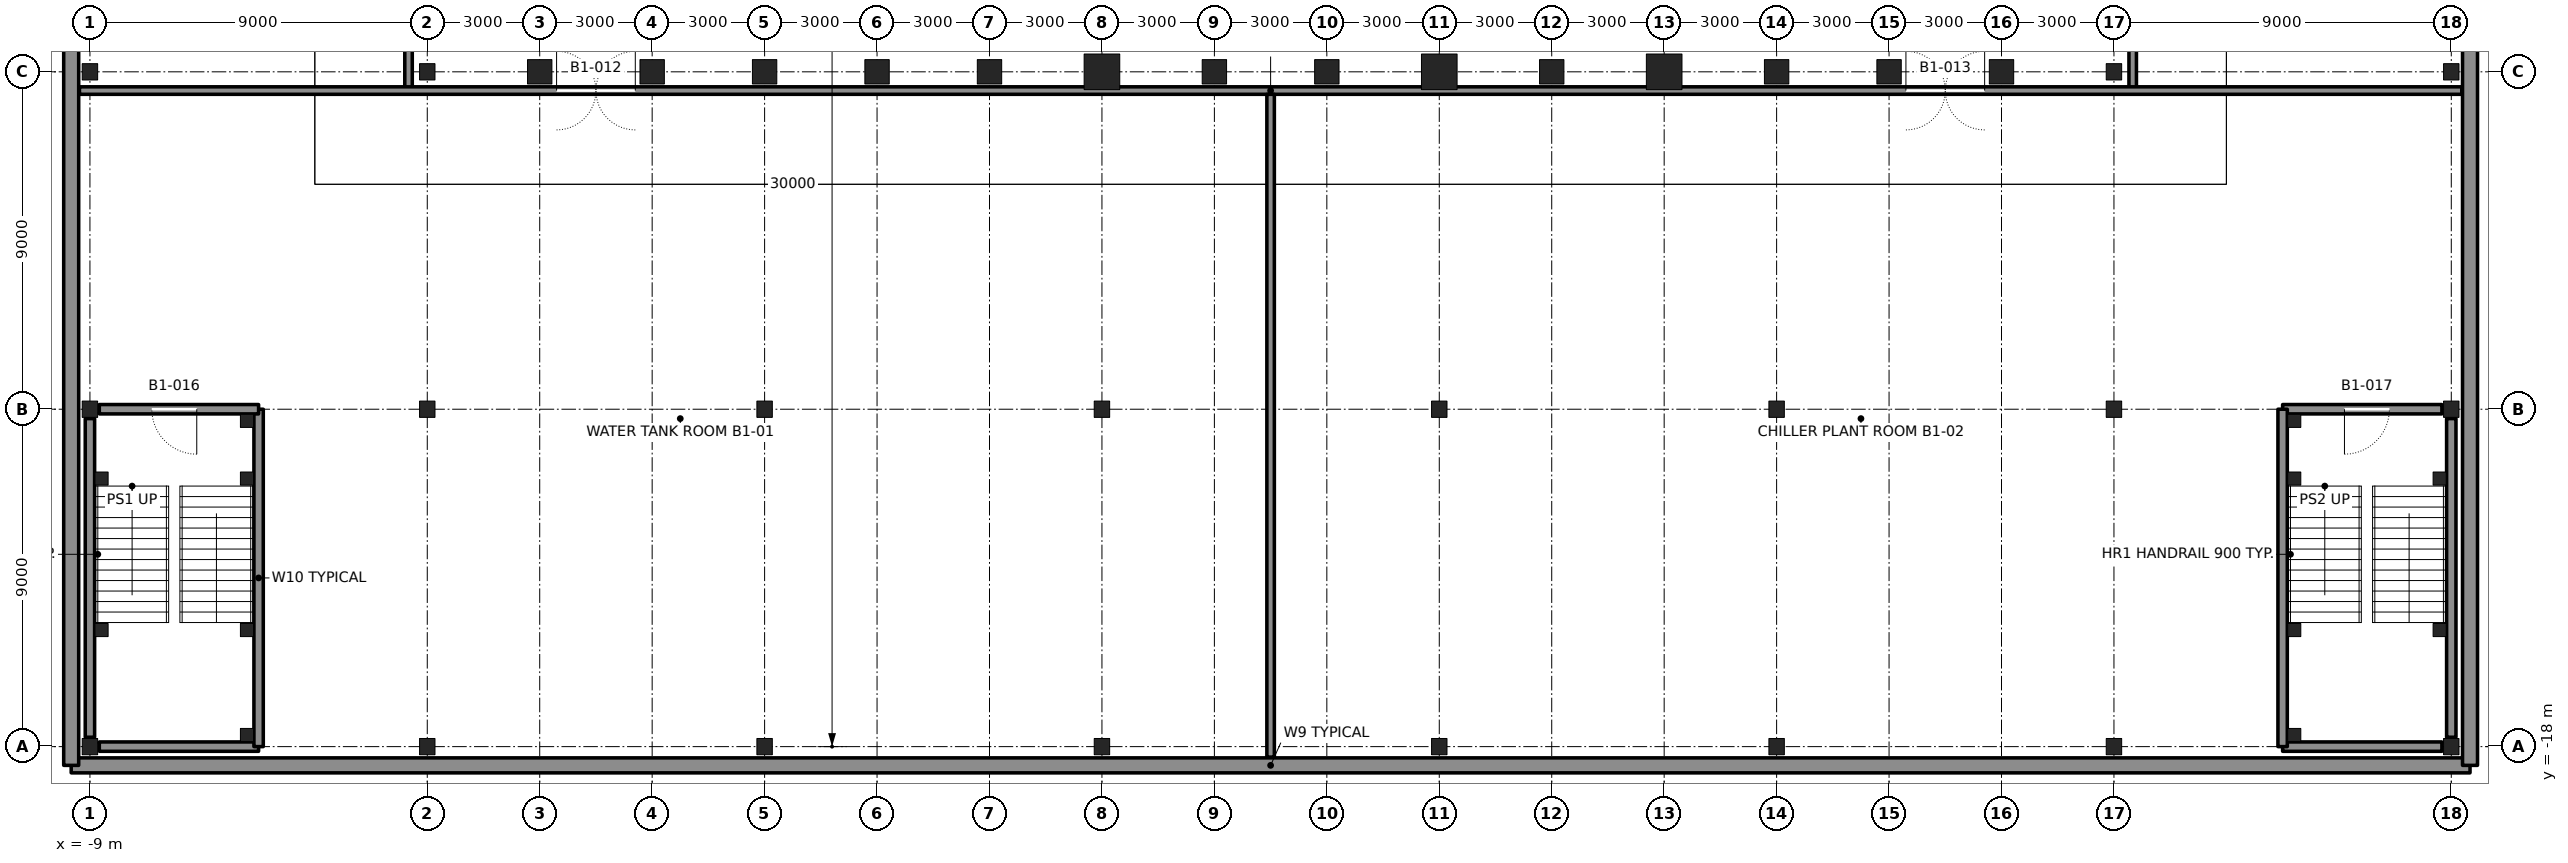
"""IFC4 building model, lengths in metres.
Left out: names, types, materials, properties, quantities, classifications, styles, units other than length and angle.
Written with IfcOpenShell. Run it as: python <this file> out.ifc"""

import sys

from ifc_helpers import new_model, si_unit, direction, frame, frame_2d, origin, origin_2d, place, context, subcontext, project, spatial, rectangle, hollow_rectangle, i_section, extrude, element, fill, save


model = new_model("IFC4")
c1 = context("Model", 3, precision=1e-05, world=origin(), true_north=direction((0.0, 1.0)))
c2 = subcontext(c1, "Body", "Model", "MODEL_VIEW")
j1 = project(units=[si_unit("LENGTHUNIT", "METRE"), si_unit("PLANEANGLEUNIT", "RADIAN")], contexts=[c1])
p1 = place(None, origin())
s1 = spatial("IfcSite", under=j1, at=p1, CompositionType="ELEMENT")
p2 = place(p1, origin())
s2 = spatial("IfcBuilding", under=s1, at=p2, CompositionType="ELEMENT")
p3 = place(p2, frame((0.0, 0.0, -5.0)))
s3 = spatial("IfcBuildingStorey", under=s2, at=p3, CompositionType="ELEMENT", Elevation=-5.0)
for number, where, z_axis, x_axis in (
    (1, (3.0, 0.0, -0.3), (0.0, 0.0, 1.0), (0.0, -1.0, 0.0)),
    (2, (6.0, 0.0, -0.3), (0.0, 0.0, 1.0), (0.0, -1.0, 0.0)),
    (3, (9.0, 0.0, -0.3), (0.0, 0.0, 1.0), (0.0, -1.0, 0.0)),
    (4, (12.0, 0.0, -0.3), (0.0, 0.0, 1.0), (0.0, -1.0, 0.0)),
    (5, (15.0, 0.0, -0.3), (0.0, 0.0, 1.0), (0.0, -1.0, 0.0)),
):
    element("IfcColumn", number, at=place(p3, frame(where, z_axis=z_axis, x_axis=x_axis)), inside=s3, PredefinedType="COLUMN", context=c2, shape_type="SweptSolid", body=[
        extrude(hollow_rectangle(XDim=0.65, YDim=0.65, WallThickness=0.065, at=origin_2d()), origin(), (0.0, 0.0, 1.0), 5.3),
    ])
p4 = place(p3, frame((18.0, 0.0, -0.3), z_axis=(0.0, 0.0, 1.0), x_axis=(0.0, -1.0, 0.0)))
e6 = element("IfcColumn", 6, at=p4, inside=s3, PredefinedType="COLUMN", context=c2, shape_type="SweptSolid", body=[
    extrude(hollow_rectangle(XDim=0.95, YDim=0.95, WallThickness=0.11, at=origin_2d()), origin(), (0.0, 0.0, 1.0), 5.3),
])
for number, where, z_axis, x_axis in (
    (7, (21.0, 0.0, -0.3), (0.0, 0.0, 1.0), (0.0, -1.0, 0.0)),
    (8, (24.0, 0.0, -0.3), (0.0, 0.0, 1.0), (0.0, -1.0, 0.0)),
):
    element("IfcColumn", number, at=place(p3, frame(where, z_axis=z_axis, x_axis=x_axis)), inside=s3, PredefinedType="COLUMN", context=c2, shape_type="SweptSolid", body=[
        extrude(hollow_rectangle(XDim=0.65, YDim=0.65, WallThickness=0.065, at=origin_2d()), origin(), (0.0, 0.0, 1.0), 5.3),
    ])
p5 = place(p3, frame((27.0, 0.0, -0.3), z_axis=(0.0, 0.0, 1.0), x_axis=(0.0, -1.0, 0.0)))
e9 = element("IfcColumn", 9, at=p5, inside=s3, PredefinedType="COLUMN", context=c2, shape_type="SweptSolid", body=[
    extrude(hollow_rectangle(XDim=0.95, YDim=0.95, WallThickness=0.11, at=origin_2d()), origin(), (0.0, 0.0, 1.0), 5.3),
])
p6 = place(p3, frame((30.0, 0.0, -0.3), z_axis=(0.0, 0.0, 1.0), x_axis=(0.0, -1.0, 0.0)))
e10 = element("IfcColumn", 10, at=p6, inside=s3, PredefinedType="COLUMN", context=c2, shape_type="SweptSolid", body=[
    extrude(hollow_rectangle(XDim=0.65, YDim=0.65, WallThickness=0.065, at=origin_2d()), origin(), (0.0, 0.0, 1.0), 5.3),
])
p7 = place(p3, frame((33.0, 0.0, -0.3), z_axis=(0.0, 0.0, 1.0), x_axis=(0.0, -1.0, 0.0)))
e11 = element("IfcColumn", 11, at=p7, inside=s3, PredefinedType="COLUMN", context=c2, shape_type="SweptSolid", body=[
    extrude(hollow_rectangle(XDim=0.95, YDim=0.95, WallThickness=0.11, at=origin_2d()), origin(), (0.0, 0.0, 1.0), 5.3),
])
for number, where, z_axis, x_axis in (
    (12, (36.0, 0.0, -0.3), (0.0, 0.0, 1.0), (0.0, -1.0, 0.0)),
    (13, (39.0, 0.0, -0.3), (0.0, 0.0, 1.0), (0.0, -1.0, 0.0)),
    (14, (42.0, 0.0, -0.3), (0.0, 0.0, 1.0), (0.0, -1.0, 0.0)),
):
    element("IfcColumn", number, at=place(p3, frame(where, z_axis=z_axis, x_axis=x_axis)), inside=s3, PredefinedType="COLUMN", context=c2, shape_type="SweptSolid", body=[
        extrude(hollow_rectangle(XDim=0.65, YDim=0.65, WallThickness=0.065, at=origin_2d()), origin(), (0.0, 0.0, 1.0), 5.3),
    ])
for number, where, z_axis, x_axis in (
    (15, (-9.0, -18.0, -0.3), (0.0, 0.0, 1.0), (1.0, 0.0, 0.0)),
    (16, (-9.0, -9.0, -0.3), (0.0, 0.0, 1.0), (1.0, 0.0, 0.0)),
    (17, (-9.0, 0.0, -0.3), (0.0, 0.0, 1.0), (1.0, 0.0, 0.0)),
    (18, (0.0, -18.0, -0.3), (0.0, 0.0, 1.0), (1.0, 0.0, 0.0)),
    (19, (0.0, -9.0, -0.3), (0.0, 0.0, 1.0), (1.0, 0.0, 0.0)),
    (20, (0.0, 0.0, -0.3), (0.0, 0.0, 1.0), (1.0, 0.0, 0.0)),
    (21, (9.0, -18.0, -0.3), (0.0, 0.0, 1.0), (1.0, 0.0, 0.0)),
    (22, (9.0, -9.0, -0.3), (0.0, 0.0, 1.0), (1.0, 0.0, 0.0)),
    (23, (18.0, -18.0, -0.3), (0.0, 0.0, 1.0), (1.0, 0.0, 0.0)),
    (24, (18.0, -9.0, -0.3), (0.0, 0.0, 1.0), (1.0, 0.0, 0.0)),
    (25, (27.0, -18.0, -0.3), (0.0, 0.0, 1.0), (1.0, 0.0, 0.0)),
    (26, (27.0, -9.0, -0.3), (0.0, 0.0, 1.0), (1.0, 0.0, 0.0)),
    (27, (36.0, -18.0, -0.3), (0.0, 0.0, 1.0), (1.0, 0.0, 0.0)),
    (28, (36.0, -9.0, -0.3), (0.0, 0.0, 1.0), (1.0, 0.0, 0.0)),
    (29, (45.0, -18.0, -0.3), (0.0, 0.0, 1.0), (1.0, 0.0, 0.0)),
    (30, (45.0, -9.0, -0.3), (0.0, 0.0, 1.0), (1.0, 0.0, 0.0)),
    (31, (45.0, 0.0, -0.3), (0.0, 0.0, 1.0), (1.0, 0.0, 0.0)),
    (32, (54.0, -18.0, -0.3), (0.0, 0.0, 1.0), (1.0, 0.0, 0.0)),
    (33, (54.0, -9.0, -0.3), (0.0, 0.0, 1.0), (1.0, 0.0, 0.0)),
    (34, (54.0, 0.0, -0.3), (0.0, 0.0, 1.0), (1.0, 0.0, 0.0)),
):
    element("IfcColumn", number, at=place(p3, frame(where, z_axis=z_axis, x_axis=x_axis)), inside=s3, PredefinedType="COLUMN", context=c2, shape_type="SweptSolid", body=[
        extrude(i_section(OverallWidth=0.411, OverallDepth=0.434, WebThickness=0.036, FlangeThickness=0.057, at=origin_2d()), origin(), (0.0, 0.0, 1.0), 5.3),
    ])
for number, where, z_axis, x_axis in (
    (35, (-9.5, -18.5, -0.3), (0.0, 0.0, 1.0), (1.0, 0.0, 0.0)),
    (36, (54.5, -18.5, -0.3), (0.0, 0.0, 1.0), (0.0, 1.0, 0.0)),
    (37, (-9.5, 45.5, -0.3), (0.0, 0.0, 1.0), (0.0, -1.0, 0.0)),
):
    element("IfcWall", number, at=place(p3, frame(where, z_axis=z_axis, x_axis=x_axis)), inside=s3, PredefinedType="USERDEFINED", context=c2, shape_type="SweptSolid", body=[
        extrude(rectangle(XDim=64.0, YDim=0.4, at=frame_2d((32.0, 0.0))), origin(), (0.0, 0.0, 1.0), 5.1),
    ])
p8 = place(p3, frame((-0.5, -0.5, 0.0), z_axis=(0.0, 0.0, 1.0), x_axis=(0.0, 1.0, 0.0)))
e38 = element("IfcWall", 38, at=p8, inside=s3, PredefinedType="PARTITIONING", context=c2, shape_type="SweptSolid", body=[
    extrude(rectangle(XDim=45.78, YDim=0.2, at=frame_2d((22.89, 0.0))), origin(), (0.0, 0.0, 1.0), 4.8),
])
p9 = place(p8, frame((12.95, 0.0, 0.0)))
e39 = element("IfcOpeningElement", 39, at=p9, cuts=e38, PredefinedType="OPENING", context=c2, shape_type="SweptSolid", body=[
    extrude(rectangle(XDim=2.1, YDim=2.4, at=frame_2d((1.05, 1.2))), frame((0.0, 0.11, 0.0), z_axis=(0.0, -1.0, 0.0), x_axis=(1.0, 0.0, 0.0)), (0.0, 0.0, 1.0), 0.22),
])
p10 = place(p3, frame((45.5, -0.5, 0.0), z_axis=(0.0, 0.0, 1.0), x_axis=(0.0, 1.0, 0.0)))
e40 = element("IfcWall", 40, at=p10, inside=s3, PredefinedType="PARTITIONING", context=c2, shape_type="SweptSolid", body=[
    extrude(rectangle(XDim=45.78, YDim=0.2, at=frame_2d((22.89, 0.0))), origin(), (0.0, 0.0, 1.0), 4.8),
])
p11 = place(p10, frame((9.875, 0.0, 0.0)))
e41 = element("IfcOpeningElement", 41, at=p11, cuts=e40, PredefinedType="OPENING", context=c2, shape_type="SweptSolid", body=[
    extrude(rectangle(XDim=2.1, YDim=2.4, at=frame_2d((1.05, 1.2))), frame((0.0, 0.11, 0.0), z_axis=(0.0, -1.0, 0.0), x_axis=(1.0, 0.0, 0.0)), (0.0, 0.0, 1.0), 0.22),
])
p12 = place(p3, frame((-9.28, -0.5, 0.0), z_axis=(0.0, 0.0, 1.0), x_axis=(1.0, 0.0, 0.0)))
e42 = element("IfcWall", 42, at=p12, inside=s3, PredefinedType="PARTITIONING", context=c2, shape_type="SweptSolid", body=[
    extrude(rectangle(XDim=63.56, YDim=0.2, at=frame_2d((31.78, 0.0))), origin(), (0.0, 0.0, 1.0), 4.8),
])
p13 = place(p12, frame((12.73, 0.0, 0.0)))
e43 = element("IfcOpeningElement", 43, at=p13, cuts=e42, PredefinedType="OPENING", context=c2, shape_type="SweptSolid", body=[
    extrude(rectangle(XDim=2.1, YDim=2.4, at=frame_2d((1.05, 1.2))), frame((0.0, 0.11, 0.0), z_axis=(0.0, -1.0, 0.0), x_axis=(1.0, 0.0, 0.0)), (0.0, 0.0, 1.0), 0.22),
])
p14 = place(p12, frame((48.73, 0.0, 0.0)))
e44 = element("IfcOpeningElement", 44, at=p14, cuts=e42, PredefinedType="OPENING", context=c2, shape_type="SweptSolid", body=[
    extrude(rectangle(XDim=2.1, YDim=2.4, at=frame_2d((1.05, 1.2))), frame((0.0, 0.11, 0.0), z_axis=(0.0, -1.0, 0.0), x_axis=(1.0, 0.0, 0.0)), (0.0, 0.0, 1.0), 0.22),
])
p15 = place(p3, frame((22.5, -18.28, 0.0), z_axis=(0.0, 0.0, 1.0), x_axis=(0.0, 1.0, 0.0)))
e45 = element("IfcWall", 45, at=p15, inside=s3, PredefinedType="PARTITIONING", context=c2, shape_type="SweptSolid", body=[
    extrude(rectangle(XDim=17.68, YDim=0.2, at=frame_2d((8.84, 0.0))), origin(), (0.0, 0.0, 1.0), 4.8),
])
p16 = place(p3, frame((-8.75, -18.0, 0.0), z_axis=(0.0, 0.0, 1.0), x_axis=(1.0, 0.0, 0.0)))
e46 = element("IfcWall", 46, at=p16, inside=s3, PredefinedType="SOLIDWALL", context=c2, shape_type="SweptSolid", body=[
    extrude(rectangle(XDim=4.25, YDim=0.25, at=frame_2d((2.125, 0.0))), origin(), (0.0, 0.0, 1.0), 3.853),
])
p17 = place(p3, frame((-4.5, -18.0, 0.0), z_axis=(0.0, 0.0, 1.0), x_axis=(0.0, 1.0, 0.0)))
e47 = element("IfcWall", 47, at=p17, inside=s3, PredefinedType="SOLIDWALL", context=c2, shape_type="SweptSolid", body=[
    extrude(rectangle(XDim=9.0, YDim=0.25, at=frame_2d((4.5, 0.0))), origin(), (0.0, 0.0, 1.0), 4.198),
])
p18 = place(p3, frame((-8.75, -9.0, 0.0), z_axis=(0.0, 0.0, 1.0), x_axis=(1.0, 0.0, 0.0)))
e48 = element("IfcWall", 48, at=p18, inside=s3, PredefinedType="SOLIDWALL", context=c2, shape_type="SweptSolid", body=[
    extrude(rectangle(XDim=4.25, YDim=0.25, at=frame_2d((2.125, 0.0))), origin(), (0.0, 0.0, 1.0), 3.853),
])
p19 = place(p18, frame((1.4, 0.0, 0.0)))
e49 = element("IfcOpeningElement", 49, at=p19, cuts=e48, PredefinedType="OPENING", context=c2, shape_type="SweptSolid", body=[
    extrude(rectangle(XDim=1.2, YDim=2.1, at=frame_2d((0.6, 1.05))), frame((0.0, 0.135, 0.0), z_axis=(0.0, -1.0, 0.0), x_axis=(1.0, 0.0, 0.0)), (0.0, 0.0, 1.0), 0.27),
])
p20 = place(p3, frame((-9.0, -17.75, 0.0), z_axis=(0.0, 0.0, 1.0), x_axis=(0.0, 1.0, 0.0)))
e50 = element("IfcWall", 50, at=p20, inside=s3, PredefinedType="SOLIDWALL", context=c2, shape_type="SweptSolid", body=[
    extrude(rectangle(XDim=8.5, YDim=0.25, at=frame_2d((4.25, 0.0))), origin(), (0.0, 0.0, 1.0), 3.853),
])
p21 = place(p3, frame((49.5, -18.0, 0.0), z_axis=(0.0, 0.0, 1.0), x_axis=(1.0, 0.0, 0.0)))
e51 = element("IfcWall", 51, at=p21, inside=s3, PredefinedType="SOLIDWALL", context=c2, shape_type="SweptSolid", body=[
    extrude(rectangle(XDim=4.25, YDim=0.25, at=frame_2d((2.125, 0.0))), origin(), (0.0, 0.0, 1.0), 3.853),
])
p22 = place(p3, frame((54.0, -17.75, 0.0), z_axis=(0.0, 0.0, 1.0), x_axis=(0.0, 1.0, 0.0)))
e52 = element("IfcWall", 52, at=p22, inside=s3, PredefinedType="SOLIDWALL", context=c2, shape_type="SweptSolid", body=[
    extrude(rectangle(XDim=8.5, YDim=0.25, at=frame_2d((4.25, 0.0))), origin(), (0.0, 0.0, 1.0), 3.853),
])
p23 = place(p3, frame((49.5, -9.0, 0.0), z_axis=(0.0, 0.0, 1.0), x_axis=(1.0, 0.0, 0.0)))
e53 = element("IfcWall", 53, at=p23, inside=s3, PredefinedType="SOLIDWALL", context=c2, shape_type="SweptSolid", body=[
    extrude(rectangle(XDim=4.25, YDim=0.25, at=frame_2d((2.125, 0.0))), origin(), (0.0, 0.0, 1.0), 3.853),
])
p24 = place(p23, frame((1.65, 0.0, 0.0)))
e54 = element("IfcOpeningElement", 54, at=p24, cuts=e53, PredefinedType="OPENING", context=c2, shape_type="SweptSolid", body=[
    extrude(rectangle(XDim=1.2, YDim=2.1, at=frame_2d((0.6, 1.05))), frame((0.0, 0.135, 0.0), z_axis=(0.0, -1.0, 0.0), x_axis=(1.0, 0.0, 0.0)), (0.0, 0.0, 1.0), 0.27),
])
p25 = place(p3, frame((49.5, -18.0, 0.0), z_axis=(0.0, 0.0, 1.0), x_axis=(0.0, 1.0, 0.0)))
e55 = element("IfcWall", 55, at=p25, inside=s3, PredefinedType="SOLIDWALL", context=c2, shape_type="SweptSolid", body=[
    extrude(rectangle(XDim=9.0, YDim=0.25, at=frame_2d((4.5, 0.0))), origin(), (0.0, 0.0, 1.0), 4.198),
])
for number, where, z_axis, x_axis in (
    (56, (-4.81, -17.69, -0.3), (0.0, 0.0, 1.0), (1.0, 0.0, 0.0)),
    (57, (-8.69, -14.89, -0.3), (0.0, 0.0, 1.0), (1.0, 0.0, 0.0)),
    (58, (-4.81, -14.89, -0.3), (0.0, 0.0, 1.0), (1.0, 0.0, 0.0)),
    (59, (-8.69, -10.85, -0.3), (0.0, 0.0, 1.0), (1.0, 0.0, 0.0)),
    (60, (-4.81, -10.85, -0.3), (0.0, 0.0, 1.0), (1.0, 0.0, 0.0)),
    (61, (-4.81, -9.31, -0.3), (0.0, 0.0, 1.0), (1.0, 0.0, 0.0)),
    (62, (49.81, -17.69, -0.3), (0.0, 0.0, 1.0), (1.0, 0.0, 0.0)),
    (63, (49.81, -14.89, -0.3), (0.0, 0.0, 1.0), (1.0, 0.0, 0.0)),
    (64, (53.69, -14.89, -0.3), (0.0, 0.0, 1.0), (1.0, 0.0, 0.0)),
    (65, (49.81, -10.85, -0.3), (0.0, 0.0, 1.0), (1.0, 0.0, 0.0)),
    (66, (53.69, -10.85, -0.3), (0.0, 0.0, 1.0), (1.0, 0.0, 0.0)),
    (67, (49.81, -9.31, -0.3), (0.0, 0.0, 1.0), (1.0, 0.0, 0.0)),
):
    element("IfcColumn", number, at=place(p3, frame(where, z_axis=z_axis, x_axis=x_axis)), inside=s3, PredefinedType="COLUMN", context=c2, shape_type="SweptSolid", body=[
        extrude(hollow_rectangle(XDim=0.35, YDim=0.35, WallThickness=0.035, at=origin_2d()), origin(), (0.0, 0.0, 1.0), 5.3),
    ])
p26 = place(p13, origin())
e68 = element("IfcDoor", 68, at=p26, inside=s3, OperationType="DOUBLE_DOOR_DOUBLE_SWING", PredefinedType="DOOR", context=c2, shape_type="SweptSolid", body=[
    extrude(rectangle(XDim=2.1, YDim=2.4, at=frame_2d((1.05, 1.2))), frame((0.0, 0.025, 0.0), z_axis=(0.0, -1.0, 0.0), x_axis=(1.0, 0.0, 0.0)), (0.0, 0.0, 1.0), 0.05),
])
fill(e43, e68)
p27 = place(p14, origin())
e69 = element("IfcDoor", 69, at=p27, inside=s3, OperationType="DOUBLE_DOOR_DOUBLE_SWING", PredefinedType="DOOR", context=c2, shape_type="SweptSolid", body=[
    extrude(rectangle(XDim=2.1, YDim=2.4, at=frame_2d((1.05, 1.2))), frame((0.0, 0.025, 0.0), z_axis=(0.0, -1.0, 0.0), x_axis=(1.0, 0.0, 0.0)), (0.0, 0.0, 1.0), 0.05),
])
fill(e44, e69)
p28 = place(p19, frame((1.2, 0.0, 0.0), z_axis=(0.0, 0.0, 1.0), x_axis=(-1.0, 0.0, 0.0)))
e70 = element("IfcDoor", 70, at=p28, inside=s3, OperationType="SINGLE_SWING_LEFT", PredefinedType="DOOR", context=c2, shape_type="SweptSolid", body=[
    extrude(rectangle(XDim=1.2, YDim=2.1, at=frame_2d((0.6, 1.05))), frame((0.0, 0.025, 0.0), z_axis=(0.0, -1.0, 0.0), x_axis=(1.0, 0.0, 0.0)), (0.0, 0.0, 1.0), 0.05),
])
fill(e49, e70)
p29 = place(p24, frame((1.2, 0.0, 0.0), z_axis=(0.0, 0.0, 1.0), x_axis=(-1.0, 0.0, 0.0)))
e71 = element("IfcDoor", 71, at=p29, inside=s3, OperationType="SINGLE_SWING_RIGHT", PredefinedType="DOOR", context=c2, shape_type="SweptSolid", body=[
    extrude(rectangle(XDim=1.2, YDim=2.1, at=frame_2d((0.6, 1.05))), frame((0.0, 0.025, 0.0), z_axis=(0.0, -1.0, 0.0), x_axis=(1.0, 0.0, 0.0)), (0.0, 0.0, 1.0), 0.05),
])
fill(e54, e71)
save(model, sys.argv[1])
